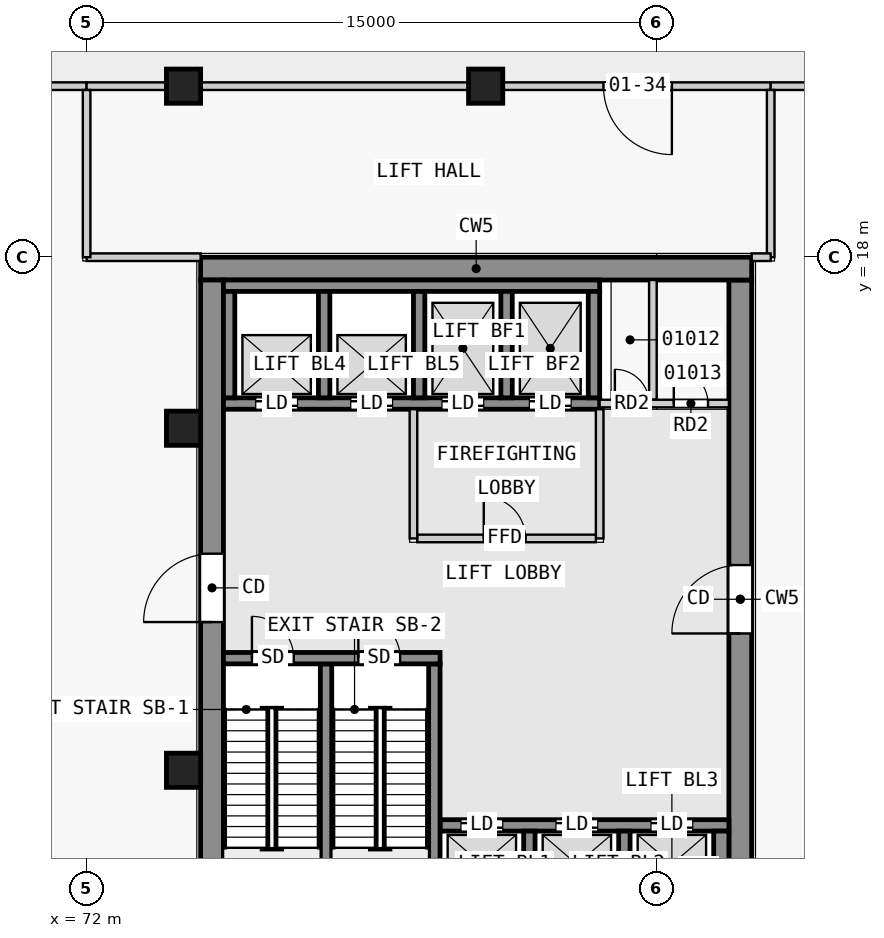
"""IFC4 building model, lengths in metres.
Left out: names, types, materials, properties, quantities, classifications, styles, units other than length and angle.
Written with IfcOpenShell. Run it as: python <this file> out.ifc"""

import sys

from ifc_helpers import new_model, si_unit, direction, frame, frame_2d, origin, origin_2d, place, context, subcontext, project, spatial, rectangle, extrude, element, fill, save


model = new_model("IFC4")
c1 = context("Model", 3, precision=1e-05, world=origin(), true_north=direction((0.0, 1.0)))
c2 = subcontext(c1, "Body", "Model", "MODEL_VIEW")
j1 = project(units=[si_unit("LENGTHUNIT", "METRE"), si_unit("PLANEANGLEUNIT", "RADIAN")], contexts=[c1])
p1 = place(None, origin())
s1 = spatial("IfcSite", under=j1, at=p1, CompositionType="ELEMENT")
p2 = place(p1, origin())
s2 = spatial("IfcBuilding", under=s1, at=p2, CompositionType="ELEMENT")
p3 = place(p2, frame((0.0, 0.0, 8.0)))
s3 = spatial("IfcBuildingStorey", under=s2, at=p3, CompositionType="ELEMENT", Elevation=8.0)
for number, where, z_axis, x_axis in (
    (1, (82.5, 22.5, 0.0), (0.0, 0.0, 1.0), (1.0, 0.0, 0.0)),
    (2, (74.55, 22.5, 0.0), (0.0, 0.0, 1.0), (1.0, 0.0, 0.0)),
    (3, (74.55, 13.5, 0.0), (0.0, 0.0, 1.0), (1.0, 0.0, 0.0)),
    (4, (74.55, 4.5, 0.0), (0.0, 0.0, 1.0), (1.0, 0.0, 0.0)),
):
    element("IfcColumn", number, at=place(p3, frame(where, z_axis=z_axis, x_axis=x_axis)), inside=s3, PredefinedType="COLUMN", context=c2, shape_type="SweptSolid", body=[
        extrude(rectangle(XDim=0.9, YDim=0.9, at=origin_2d()), origin(), (0.0, 0.0, 1.0), 4.8),
    ])
p4 = place(p3, frame((75.0, 17.7, 0.0), z_axis=(0.0, 0.0, 1.0), x_axis=(1.0, 0.0, 0.0)))
e5 = element("IfcWall", 5, at=p4, inside=s3, PredefinedType="SHEAR", context=c2, shape_type="SweptSolid", body=[
    extrude(rectangle(XDim=14.5, YDim=0.6, at=frame_2d((7.25, 0.0))), origin(), (0.0, 0.0, 1.0), 4.45),
])
p5 = place(p3, frame((75.3, 0.6, 0.0), z_axis=(0.0, 0.0, 1.0), x_axis=(0.0, 1.0, 0.0)))
e6 = element("IfcWall", 6, at=p5, inside=s3, PredefinedType="SHEAR", context=c2, shape_type="SweptSolid", body=[
    extrude(rectangle(XDim=16.8, YDim=0.6, at=frame_2d((8.4, 0.0))), origin(), (0.0, 0.0, 1.0), 4.45),
])
p6 = place(p5, frame((7.8, 0.0, 0.0)))
e7 = element("IfcOpeningElement", 7, at=p6, cuts=e6, PredefinedType="OPENING", context=c2, shape_type="SweptSolid", body=[
    extrude(rectangle(XDim=1.8, YDim=2.1, at=frame_2d((0.9, 1.05))), frame((0.0, 0.31, 0.0), z_axis=(0.0, -1.0, 0.0), x_axis=(1.0, 0.0, 0.0)), (0.0, 0.0, 1.0), 0.62),
])
p7 = place(p3, frame((89.2, 0.6, 0.0), z_axis=(0.0, 0.0, 1.0), x_axis=(0.0, 1.0, 0.0)))
e8 = element("IfcWall", 8, at=p7, inside=s3, PredefinedType="SHEAR", context=c2, shape_type="SweptSolid", body=[
    extrude(rectangle(XDim=16.8, YDim=0.6, at=frame_2d((8.4, 0.0))), origin(), (0.0, 0.0, 1.0), 4.45),
])
p8 = place(p7, frame((7.5, 0.0, 0.0)))
e9 = element("IfcOpeningElement", 9, at=p8, cuts=e8, PredefinedType="OPENING", context=c2, shape_type="SweptSolid", body=[
    extrude(rectangle(XDim=1.8, YDim=2.1, at=frame_2d((0.9, 1.05))), frame((0.0, 0.31, 0.0), z_axis=(0.0, -1.0, 0.0), x_axis=(1.0, 0.0, 0.0)), (0.0, 0.0, 1.0), 0.62),
])
p9 = place(p3, frame((75.6, 7.45, 0.0), z_axis=(0.0, 0.0, 1.0), x_axis=(1.0, 0.0, 0.0)))
e10 = element("IfcWall", 10, at=p9, inside=s3, PredefinedType="SHEAR", context=c2, shape_type="SweptSolid", body=[
    extrude(rectangle(XDim=5.7, YDim=0.3, at=frame_2d((2.85, 0.0))), origin(), (0.0, 0.0, 1.0), 4.45),
])
p10 = place(p9, frame((0.75, 0.0, 0.0)))
e11 = element("IfcOpeningElement", 11, at=p10, cuts=e10, PredefinedType="OPENING", context=c2, shape_type="SweptSolid", body=[
    extrude(rectangle(XDim=1.1, YDim=2.1, at=frame_2d((0.55, 1.05))), frame((0.0, 0.16, 0.0), z_axis=(0.0, -1.0, 0.0), x_axis=(1.0, 0.0, 0.0)), (0.0, 0.0, 1.0), 0.32),
])
p11 = place(p9, frame((3.55, 0.0, 0.0)))
e12 = element("IfcOpeningElement", 12, at=p11, cuts=e10, PredefinedType="OPENING", context=c2, shape_type="SweptSolid", body=[
    extrude(rectangle(XDim=1.1, YDim=2.1, at=frame_2d((0.55, 1.05))), frame((0.0, 0.16, 0.0), z_axis=(0.0, -1.0, 0.0), x_axis=(1.0, 0.0, 0.0)), (0.0, 0.0, 1.0), 0.32),
])
for number, where, z_axis, x_axis in (
    (13, (78.3, 0.9, 0.0), (0.0, 0.0, 1.0), (0.0, 1.0, 0.0)),
    (14, (81.15, 0.9, 0.0), (0.0, 0.0, 1.0), (0.0, 1.0, 0.0)),
):
    element("IfcWall", number, at=place(p3, frame(where, z_axis=z_axis, x_axis=x_axis)), inside=s3, PredefinedType="SHEAR", context=c2, shape_type="SweptSolid", body=[
        extrude(rectangle(XDim=6.4, YDim=0.3, at=frame_2d((3.2, 0.0))), origin(), (0.0, 0.0, 1.0), 4.45),
    ])
for number, where, z_axis, x_axis in (
    (15, (83.65, 0.9, 0.0), (0.0, 0.0, 1.0), (0.0, 1.0, 0.0)),
    (16, (86.15, 0.9, 0.0), (0.0, 0.0, 1.0), (0.0, 1.0, 0.0)),
):
    element("IfcWall", number, at=place(p3, frame(where, z_axis=z_axis, x_axis=x_axis)), inside=s3, PredefinedType="SHEAR", context=c2, shape_type="SweptSolid", body=[
        extrude(rectangle(XDim=2.0, YDim=0.3, at=frame_2d((1.0, 0.0))), origin(), (0.0, 0.0, 1.0), 4.45),
    ])
p12 = place(p3, frame((88.7, 0.9, 0.0), z_axis=(0.0, 0.0, 1.0), x_axis=(0.0, 1.0, 0.0)))
e17 = element("IfcWall", 17, at=p12, inside=s3, PredefinedType="SHEAR", context=c2, shape_type="SweptSolid", body=[
    extrude(rectangle(XDim=2.0, YDim=0.4, at=frame_2d((1.0, 0.0))), origin(), (0.0, 0.0, 1.0), 4.45),
])
p13 = place(p3, frame((81.3, 3.05, 0.0), z_axis=(0.0, 0.0, 1.0), x_axis=(1.0, 0.0, 0.0)))
e18 = element("IfcWall", 18, at=p13, inside=s3, PredefinedType="SHEAR", context=c2, shape_type="SweptSolid", body=[
    extrude(rectangle(XDim=7.6, YDim=0.3, at=frame_2d((3.8, 0.0))), origin(), (0.0, 0.0, 1.0), 4.45),
])
p14 = place(p13, frame((0.55, 0.0, 0.0)))
e19 = element("IfcOpeningElement", 19, at=p14, cuts=e18, PredefinedType="OPENING", context=c2, shape_type="SweptSolid", body=[
    extrude(rectangle(XDim=1.1, YDim=2.1, at=frame_2d((0.55, 1.05))), frame((0.0, 0.16, 0.0), z_axis=(0.0, -1.0, 0.0), x_axis=(1.0, 0.0, 0.0)), (0.0, 0.0, 1.0), 0.32),
])
p15 = place(p13, frame((3.05, 0.0, 0.0)))
e20 = element("IfcOpeningElement", 20, at=p15, cuts=e18, PredefinedType="OPENING", context=c2, shape_type="SweptSolid", body=[
    extrude(rectangle(XDim=1.1, YDim=2.1, at=frame_2d((0.55, 1.05))), frame((0.0, 0.16, 0.0), z_axis=(0.0, -1.0, 0.0), x_axis=(1.0, 0.0, 0.0)), (0.0, 0.0, 1.0), 0.32),
])
p16 = place(p13, frame((5.55, 0.0, 0.0)))
e21 = element("IfcOpeningElement", 21, at=p16, cuts=e18, PredefinedType="OPENING", context=c2, shape_type="SweptSolid", body=[
    extrude(rectangle(XDim=1.1, YDim=2.1, at=frame_2d((0.55, 1.05))), frame((0.0, 0.16, 0.0), z_axis=(0.0, -1.0, 0.0), x_axis=(1.0, 0.0, 0.0)), (0.0, 0.0, 1.0), 0.32),
])
p17 = place(p3, frame((75.6, 17.25, 0.0), z_axis=(0.0, 0.0, 1.0), x_axis=(1.0, 0.0, 0.0)))
e22 = element("IfcWall", 22, at=p17, inside=s3, PredefinedType="SHEAR", context=c2, shape_type="SweptSolid", body=[
    extrude(rectangle(XDim=9.9, YDim=0.3, at=frame_2d((4.95, 0.0))), origin(), (0.0, 0.0, 1.0), 4.45),
])
p18 = place(p3, frame((75.6, 14.15, 0.0), z_axis=(0.0, 0.0, 1.0), x_axis=(1.0, 0.0, 0.0)))
e23 = element("IfcWall", 23, at=p18, inside=s3, PredefinedType="SHEAR", context=c2, shape_type="SweptSolid", body=[
    extrude(rectangle(XDim=9.9, YDim=0.3, at=frame_2d((4.95, 0.0))), origin(), (0.0, 0.0, 1.0), 4.45),
])
p19 = place(p18, frame((0.85, 0.0, 0.0)))
e24 = element("IfcOpeningElement", 24, at=p19, cuts=e23, PredefinedType="OPENING", context=c2, shape_type="SweptSolid", body=[
    extrude(rectangle(XDim=1.1, YDim=2.1, at=frame_2d((0.55, 1.05))), frame((0.0, 0.16, 0.0), z_axis=(0.0, -1.0, 0.0), x_axis=(1.0, 0.0, 0.0)), (0.0, 0.0, 1.0), 0.32),
])
p20 = place(p18, frame((3.35, 0.0, 0.0)))
e25 = element("IfcOpeningElement", 25, at=p20, cuts=e23, PredefinedType="OPENING", context=c2, shape_type="SweptSolid", body=[
    extrude(rectangle(XDim=1.1, YDim=2.1, at=frame_2d((0.55, 1.05))), frame((0.0, 0.16, 0.0), z_axis=(0.0, -1.0, 0.0), x_axis=(1.0, 0.0, 0.0)), (0.0, 0.0, 1.0), 0.32),
])
p21 = place(p18, frame((5.75, 0.0, 0.0)))
e26 = element("IfcOpeningElement", 26, at=p21, cuts=e23, PredefinedType="OPENING", context=c2, shape_type="SweptSolid", body=[
    extrude(rectangle(XDim=1.1, YDim=2.1, at=frame_2d((0.55, 1.05))), frame((0.0, 0.16, 0.0), z_axis=(0.0, -1.0, 0.0), x_axis=(1.0, 0.0, 0.0)), (0.0, 0.0, 1.0), 0.32),
])
p22 = place(p18, frame((8.05, 0.0, 0.0)))
e27 = element("IfcOpeningElement", 27, at=p22, cuts=e23, PredefinedType="OPENING", context=c2, shape_type="SweptSolid", body=[
    extrude(rectangle(XDim=1.1, YDim=2.1, at=frame_2d((0.55, 1.05))), frame((0.0, 0.16, 0.0), z_axis=(0.0, -1.0, 0.0), x_axis=(1.0, 0.0, 0.0)), (0.0, 0.0, 1.0), 0.32),
])
for number, where, z_axis, x_axis in (
    (28, (75.75, 14.3, 0.0), (0.0, 0.0, 1.0), (0.0, 1.0, 0.0)),
    (29, (78.25, 14.3, 0.0), (0.0, 0.0, 1.0), (0.0, 1.0, 0.0)),
    (30, (80.75, 14.3, 0.0), (0.0, 0.0, 1.0), (0.0, 1.0, 0.0)),
    (31, (83.05, 14.3, 0.0), (0.0, 0.0, 1.0), (0.0, 1.0, 0.0)),
    (32, (85.35, 14.3, 0.0), (0.0, 0.0, 1.0), (0.0, 1.0, 0.0)),
):
    element("IfcWall", number, at=place(p3, frame(where, z_axis=z_axis, x_axis=x_axis)), inside=s3, PredefinedType="SHEAR", context=c2, shape_type="SweptSolid", body=[
        extrude(rectangle(XDim=2.8, YDim=0.3, at=frame_2d((1.4, 0.0))), origin(), (0.0, 0.0, 1.0), 4.45),
    ])
p23 = place(p3, frame((80.6, 10.6, 0.0), z_axis=(0.0, 0.0, 1.0), x_axis=(0.0, 1.0, 0.0)))
e33 = element("IfcWall", 33, at=p23, inside=s3, PredefinedType="PARTITIONING", context=c2, shape_type="SweptSolid", body=[
    extrude(rectangle(XDim=3.4, YDim=0.2, at=frame_2d((1.7, 0.0))), origin(), (0.0, 0.0, 1.0), 4.45),
])
p24 = place(p3, frame((80.7, 10.6, 0.0), z_axis=(0.0, 0.0, 1.0), x_axis=(1.0, 0.0, 0.0)))
e34 = element("IfcWall", 34, at=p24, inside=s3, PredefinedType="PARTITIONING", context=c2, shape_type="SweptSolid", body=[
    extrude(rectangle(XDim=4.7, YDim=0.2, at=frame_2d((2.35, 0.0))), origin(), (0.0, 0.0, 1.0), 4.45),
])
p25 = place(p24, frame((1.75, 0.0, 0.0)))
e35 = element("IfcOpeningElement", 35, at=p25, cuts=e34, PredefinedType="OPENING", context=c2, shape_type="SweptSolid", body=[
    extrude(rectangle(XDim=1.1, YDim=2.1, at=frame_2d((0.55, 1.05))), frame((0.0, 0.11, 0.0), z_axis=(0.0, -1.0, 0.0), x_axis=(1.0, 0.0, 0.0)), (0.0, 0.0, 1.0), 0.22),
])
p26 = place(p3, frame((85.5, 10.6, 0.0), z_axis=(0.0, 0.0, 1.0), x_axis=(0.0, 1.0, 0.0)))
e36 = element("IfcWall", 36, at=p26, inside=s3, PredefinedType="PARTITIONING", context=c2, shape_type="SweptSolid", body=[
    extrude(rectangle(XDim=3.4, YDim=0.2, at=frame_2d((1.7, 0.0))), origin(), (0.0, 0.0, 1.0), 4.45),
])
p27 = place(p3, frame((85.5, 14.15, 0.0), z_axis=(0.0, 0.0, 1.0), x_axis=(1.0, 0.0, 0.0)))
e37 = element("IfcWall", 37, at=p27, inside=s3, PredefinedType="PARTITIONING", context=c2, shape_type="SweptSolid", body=[
    extrude(rectangle(XDim=3.4, YDim=0.2, at=frame_2d((1.7, 0.0))), origin(), (0.0, 0.0, 1.0), 4.45),
])
p28 = place(p27, frame((0.4, 0.0, 0.0)))
e38 = element("IfcOpeningElement", 38, at=p28, cuts=e37, PredefinedType="OPENING", context=c2, shape_type="SweptSolid", body=[
    extrude(rectangle(XDim=0.9, YDim=2.1, at=frame_2d((0.45, 1.05))), frame((0.0, 0.11, 0.0), z_axis=(0.0, -1.0, 0.0), x_axis=(1.0, 0.0, 0.0)), (0.0, 0.0, 1.0), 0.22),
])
p29 = place(p27, frame((1.95, 0.0, 0.0)))
e39 = element("IfcOpeningElement", 39, at=p29, cuts=e37, PredefinedType="OPENING", context=c2, shape_type="SweptSolid", body=[
    extrude(rectangle(XDim=0.9, YDim=2.1, at=frame_2d((0.45, 1.05))), frame((0.0, 0.11, 0.0), z_axis=(0.0, -1.0, 0.0), x_axis=(1.0, 0.0, 0.0)), (0.0, 0.0, 1.0), 0.22),
])
p30 = place(p3, frame((86.9, 14.25, 0.0), z_axis=(0.0, 0.0, 1.0), x_axis=(0.0, 1.0, 0.0)))
e40 = element("IfcWall", 40, at=p30, inside=s3, PredefinedType="PARTITIONING", context=c2, shape_type="SweptSolid", body=[
    extrude(rectangle(XDim=3.15, YDim=0.2, at=frame_2d((1.575, 0.0))), origin(), (0.0, 0.0, 1.0), 4.45),
])
p31 = place(p3, frame((72.0, 22.5, 0.0), z_axis=(0.0, 0.0, 1.0), x_axis=(-1.0, 0.0, 0.0)))
e41 = element("IfcWall", 41, at=p31, inside=s3, PredefinedType="PARTITIONING", context=c2, shape_type="SweptSolid", body=[
    extrude(rectangle(XDim=27.0, YDim=0.2, at=frame_2d((13.5, 0.0))), origin(), (0.0, 0.0, 1.0), 3.75),
])
p32 = place(p31, frame((12.6, 0.0, 0.0)))
e42 = element("IfcOpeningElement", 42, at=p32, cuts=e41, PredefinedType="OPENING", context=c2, shape_type="SweptSolid", body=[
    extrude(rectangle(XDim=1.8, YDim=2.1, at=frame_2d((0.9, 1.05))), frame((0.0, 0.11, 0.0), z_axis=(0.0, -1.0, 0.0), x_axis=(1.0, 0.0, 0.0)), (0.0, 0.0, 1.0), 0.22),
])
p33 = place(p3, frame((90.0, 22.5, 0.0), z_axis=(0.0, 0.0, 1.0), x_axis=(-1.0, 0.0, 0.0)))
e43 = element("IfcWall", 43, at=p33, inside=s3, PredefinedType="PARTITIONING", context=c2, shape_type="SweptSolid", body=[
    extrude(rectangle(XDim=7.05, YDim=0.2, at=frame_2d((3.525, 0.0))), origin(), (0.0, 0.0, 1.0), 4.45),
])
p34 = place(p33, frame((2.6, 0.0, 0.0)))
e44 = element("IfcOpeningElement", 44, at=p34, cuts=e43, PredefinedType="OPENING", context=c2, shape_type="SweptSolid", body=[
    extrude(rectangle(XDim=1.8, YDim=2.1, at=frame_2d((0.9, 1.05))), frame((0.0, 0.11, 0.0), z_axis=(0.0, -1.0, 0.0), x_axis=(1.0, 0.0, 0.0)), (0.0, 0.0, 1.0), 0.22),
])
p35 = place(p3, frame((82.05, 22.5, 0.0), z_axis=(0.0, 0.0, 1.0), x_axis=(-1.0, 0.0, 0.0)))
e45 = element("IfcWall", 45, at=p35, inside=s3, PredefinedType="PARTITIONING", context=c2, shape_type="SweptSolid", body=[
    extrude(rectangle(XDim=7.05, YDim=0.2, at=frame_2d((3.525, 0.0))), origin(), (0.0, 0.0, 1.0), 4.45),
])
p36 = place(p3, frame((74.1, 22.5, 0.0), z_axis=(0.0, 0.0, 1.0), x_axis=(-1.0, 0.0, 0.0)))
e46 = element("IfcWall", 46, at=p36, inside=s3, PredefinedType="PARTITIONING", context=c2, shape_type="SweptSolid", body=[
    extrude(rectangle(XDim=2.1, YDim=0.2, at=frame_2d((1.05, 0.0))), origin(), (0.0, 0.0, 1.0), 4.45),
])
p37 = place(p3, frame((91.05, 22.5, 0.0), z_axis=(0.0, 0.0, 1.0), x_axis=(-1.0, 0.0, 0.0)))
e47 = element("IfcWall", 47, at=p37, inside=s3, PredefinedType="PARTITIONING", context=c2, shape_type="SweptSolid", body=[
    extrude(rectangle(XDim=1.05, YDim=0.2, at=frame_2d((0.525, 0.0))), origin(), (0.0, 0.0, 1.0), 4.45),
])
p38 = place(p3, frame((75.0, 18.0, 0.0), z_axis=(0.0, 0.0, 1.0), x_axis=(-1.0, 0.0, 0.0)))
e48 = element("IfcWall", 48, at=p38, inside=s3, PredefinedType="PARTITIONING", context=c2, shape_type="SweptSolid", body=[
    extrude(rectangle(XDim=3.0, YDim=0.2, at=frame_2d((1.5, 0.0))), origin(), (0.0, 0.0, 1.0), 4.45),
])
for number, where, z_axis, x_axis in (
    (49, (72.0, 18.0, 0.0), (0.0, 0.0, 1.0), (0.0, 1.0, 0.0)),
    (50, (90.0, 22.4, 0.0), (0.0, 0.0, 1.0), (0.0, -1.0, 0.0)),
):
    element("IfcWall", number, at=place(p3, frame(where, z_axis=z_axis, x_axis=x_axis)), inside=s3, PredefinedType="PARTITIONING", context=c2, shape_type="SweptSolid", body=[
        extrude(rectangle(XDim=4.4, YDim=0.2, at=frame_2d((2.2, 0.0))), origin(), (0.0, 0.0, 1.0), 4.45),
    ])
p39 = place(p3, frame((90.0, 18.0, 0.0), z_axis=(0.0, 0.0, 1.0), x_axis=(-1.0, 0.0, 0.0)))
e51 = element("IfcWall", 51, at=p39, inside=s3, PredefinedType="PARTITIONING", context=c2, shape_type="SweptSolid", body=[
    extrude(rectangle(XDim=0.5, YDim=0.2, at=frame_2d((0.25, 0.0))), origin(), (0.0, 0.0, 1.0), 4.45),
])
p40 = place(p25, origin())
e52 = element("IfcDoor", 52, at=p40, inside=s3, OperationType="SINGLE_SWING_LEFT", PredefinedType="DOOR", context=c2, shape_type="SweptSolid", body=[
    extrude(rectangle(XDim=1.1, YDim=2.1, at=frame_2d((0.55, 1.05))), frame((0.0, 0.025, 0.0), z_axis=(0.0, -1.0, 0.0), x_axis=(1.0, 0.0, 0.0)), (0.0, 0.0, 1.0), 0.05),
])
fill(e35, e52)
p41 = place(p14, origin())
e53 = element("IfcDoor", 53, at=p41, inside=s3, OperationType="DOUBLE_DOOR_SLIDING", PredefinedType="DOOR", context=c2, shape_type="SweptSolid", body=[
    extrude(rectangle(XDim=1.1, YDim=2.1, at=frame_2d((0.55, 1.05))), frame((0.0, 0.025, 0.0), z_axis=(0.0, -1.0, 0.0), x_axis=(1.0, 0.0, 0.0)), (0.0, 0.0, 1.0), 0.05),
])
fill(e19, e53)
p42 = place(p15, origin())
e54 = element("IfcDoor", 54, at=p42, inside=s3, OperationType="DOUBLE_DOOR_SLIDING", PredefinedType="DOOR", context=c2, shape_type="SweptSolid", body=[
    extrude(rectangle(XDim=1.1, YDim=2.1, at=frame_2d((0.55, 1.05))), frame((0.0, 0.025, 0.0), z_axis=(0.0, -1.0, 0.0), x_axis=(1.0, 0.0, 0.0)), (0.0, 0.0, 1.0), 0.05),
])
fill(e20, e54)
p43 = place(p16, origin())
e55 = element("IfcDoor", 55, at=p43, inside=s3, OperationType="DOUBLE_DOOR_SLIDING", PredefinedType="DOOR", context=c2, shape_type="SweptSolid", body=[
    extrude(rectangle(XDim=1.1, YDim=2.1, at=frame_2d((0.55, 1.05))), frame((0.0, 0.025, 0.0), z_axis=(0.0, -1.0, 0.0), x_axis=(1.0, 0.0, 0.0)), (0.0, 0.0, 1.0), 0.05),
])
fill(e21, e55)
p44 = place(p19, origin())
e56 = element("IfcDoor", 56, at=p44, inside=s3, OperationType="DOUBLE_DOOR_SLIDING", PredefinedType="DOOR", context=c2, shape_type="SweptSolid", body=[
    extrude(rectangle(XDim=1.1, YDim=2.1, at=frame_2d((0.55, 1.05))), frame((0.0, 0.025, 0.0), z_axis=(0.0, -1.0, 0.0), x_axis=(1.0, 0.0, 0.0)), (0.0, 0.0, 1.0), 0.05),
])
fill(e24, e56)
p45 = place(p20, origin())
e57 = element("IfcDoor", 57, at=p45, inside=s3, OperationType="DOUBLE_DOOR_SLIDING", PredefinedType="DOOR", context=c2, shape_type="SweptSolid", body=[
    extrude(rectangle(XDim=1.1, YDim=2.1, at=frame_2d((0.55, 1.05))), frame((0.0, 0.025, 0.0), z_axis=(0.0, -1.0, 0.0), x_axis=(1.0, 0.0, 0.0)), (0.0, 0.0, 1.0), 0.05),
])
fill(e25, e57)
p46 = place(p21, origin())
e58 = element("IfcDoor", 58, at=p46, inside=s3, OperationType="DOUBLE_DOOR_SLIDING", PredefinedType="DOOR", context=c2, shape_type="SweptSolid", body=[
    extrude(rectangle(XDim=1.1, YDim=2.1, at=frame_2d((0.55, 1.05))), frame((0.0, 0.025, 0.0), z_axis=(0.0, -1.0, 0.0), x_axis=(1.0, 0.0, 0.0)), (0.0, 0.0, 1.0), 0.05),
])
fill(e26, e58)
p47 = place(p22, origin())
e59 = element("IfcDoor", 59, at=p47, inside=s3, OperationType="DOUBLE_DOOR_SLIDING", PredefinedType="DOOR", context=c2, shape_type="SweptSolid", body=[
    extrude(rectangle(XDim=1.1, YDim=2.1, at=frame_2d((0.55, 1.05))), frame((0.0, 0.025, 0.0), z_axis=(0.0, -1.0, 0.0), x_axis=(1.0, 0.0, 0.0)), (0.0, 0.0, 1.0), 0.05),
])
fill(e27, e59)
p48 = place(p10, origin())
e60 = element("IfcDoor", 60, at=p48, inside=s3, OperationType="SINGLE_SWING_RIGHT", PredefinedType="DOOR", context=c2, shape_type="SweptSolid", body=[
    extrude(rectangle(XDim=1.1, YDim=2.1, at=frame_2d((0.55, 1.05))), frame((0.0, 0.025, 0.0), z_axis=(0.0, -1.0, 0.0), x_axis=(1.0, 0.0, 0.0)), (0.0, 0.0, 1.0), 0.05),
])
fill(e11, e60)
p49 = place(p11, origin())
e61 = element("IfcDoor", 61, at=p49, inside=s3, OperationType="SINGLE_SWING_LEFT", PredefinedType="DOOR", context=c2, shape_type="SweptSolid", body=[
    extrude(rectangle(XDim=1.1, YDim=2.1, at=frame_2d((0.55, 1.05))), frame((0.0, 0.025, 0.0), z_axis=(0.0, -1.0, 0.0), x_axis=(1.0, 0.0, 0.0)), (0.0, 0.0, 1.0), 0.05),
])
fill(e12, e61)
p50 = place(p6, origin())
e62 = element("IfcDoor", 62, at=p50, inside=s3, OperationType="DOUBLE_DOOR_SINGLE_SWING", PredefinedType="DOOR", context=c2, shape_type="SweptSolid", body=[
    extrude(rectangle(XDim=1.8, YDim=2.1, at=frame_2d((0.9, 1.05))), frame((0.0, 0.025, 0.0), z_axis=(0.0, -1.0, 0.0), x_axis=(1.0, 0.0, 0.0)), (0.0, 0.0, 1.0), 0.05),
])
fill(e7, e62)
p51 = place(p8, origin())
e63 = element("IfcDoor", 63, at=p51, inside=s3, OperationType="DOUBLE_DOOR_SINGLE_SWING", PredefinedType="DOOR", context=c2, shape_type="SweptSolid", body=[
    extrude(rectangle(XDim=1.8, YDim=2.1, at=frame_2d((0.9, 1.05))), frame((0.0, 0.025, 0.0), z_axis=(0.0, -1.0, 0.0), x_axis=(1.0, 0.0, 0.0)), (0.0, 0.0, 1.0), 0.05),
])
fill(e9, e63)
p52 = place(p28, origin())
e64 = element("IfcDoor", 64, at=p52, inside=s3, OperationType="SINGLE_SWING_LEFT", PredefinedType="DOOR", context=c2, shape_type="SweptSolid", body=[
    extrude(rectangle(XDim=0.9, YDim=2.1, at=frame_2d((0.45, 1.05))), frame((0.0, 0.025, 0.0), z_axis=(0.0, -1.0, 0.0), x_axis=(1.0, 0.0, 0.0)), (0.0, 0.0, 1.0), 0.05),
])
fill(e38, e64)
p53 = place(p29, origin())
e65 = element("IfcDoor", 65, at=p53, inside=s3, OperationType="SINGLE_SWING_LEFT", PredefinedType="DOOR", context=c2, shape_type="SweptSolid", body=[
    extrude(rectangle(XDim=0.9, YDim=2.1, at=frame_2d((0.45, 1.05))), frame((0.0, 0.025, 0.0), z_axis=(0.0, -1.0, 0.0), x_axis=(1.0, 0.0, 0.0)), (0.0, 0.0, 1.0), 0.05),
])
fill(e39, e65)
p54 = place(p34, origin())
e66 = element("IfcDoor", 66, at=p54, inside=s3, OperationType="DOUBLE_DOOR_SINGLE_SWING", PredefinedType="DOOR", context=c2, shape_type="SweptSolid", body=[
    extrude(rectangle(XDim=1.8, YDim=2.1, at=frame_2d((0.9, 1.05))), frame((0.0, 0.025, 0.0), z_axis=(0.0, -1.0, 0.0), x_axis=(1.0, 0.0, 0.0)), (0.0, 0.0, 1.0), 0.05),
])
fill(e44, e66)
save(model, sys.argv[1])
